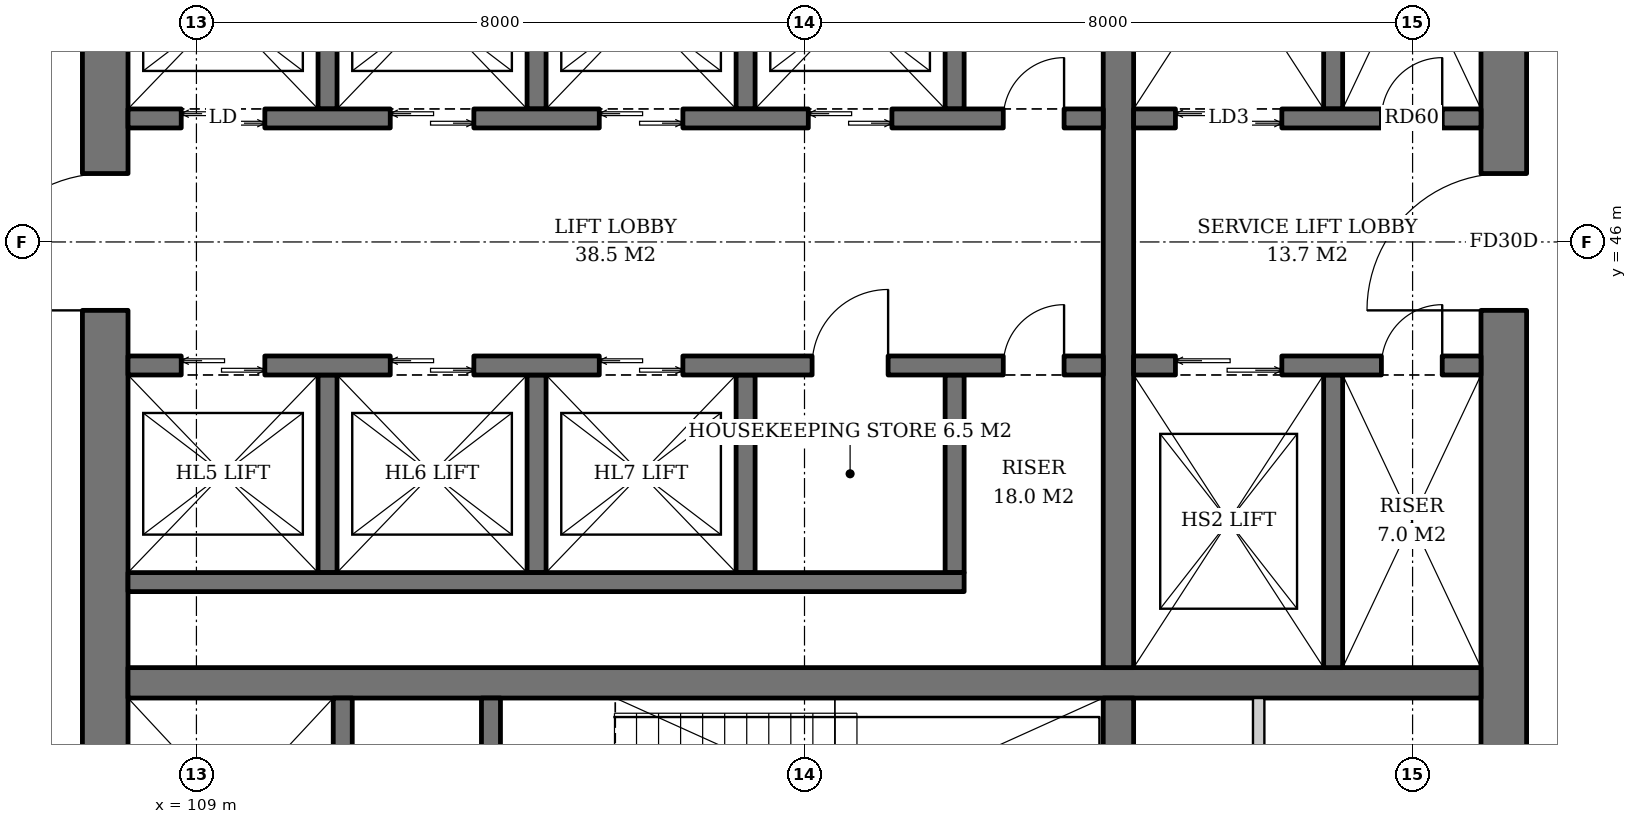
"""IFC4 building model, lengths in metres.
Left out: names, types, materials, properties, quantities, classifications, styles, units other than length and angle.
Written with IfcOpenShell. Run it as: python <this file> out.ifc"""

import sys

from ifc_helpers import new_model, si_unit, direction, frame, frame_2d, origin, place, context, subcontext, project, spatial, rectangle, extrude, element, fill, save


model = new_model("IFC4")
c1 = context("Model", 3, precision=1e-05, world=origin(), true_north=direction((0.0, 1.0)))
c2 = subcontext(c1, "Body", "Model", "MODEL_VIEW")
j1 = project(units=[si_unit("LENGTHUNIT", "METRE"), si_unit("PLANEANGLEUNIT", "RADIAN")], contexts=[c1])
p1 = place(None, origin())
s1 = spatial("IfcSite", under=j1, at=p1, CompositionType="ELEMENT")
p2 = place(p1, origin())
s2 = spatial("IfcBuilding", under=s1, at=p2, CompositionType="ELEMENT")
p3 = place(p2, frame((0.0, 0.0, 74.2)))
s3 = spatial("IfcBuildingStorey", under=s2, at=p3, CompositionType="ELEMENT", Elevation=74.2)
p4 = place(p3, frame((107.8, 37.1, 0.0), z_axis=(0.0, 0.0, 1.0), x_axis=(0.0, 1.0, 0.0)))
e1 = element("IfcWall", 1, at=p4, inside=s3, PredefinedType="SHEAR", context=c2, shape_type="SweptSolid", body=[
    extrude(rectangle(XDim=17.8, YDim=0.6, at=frame_2d((8.9, 0.0))), origin(), (0.0, 0.0, 1.0), 3.8),
])
p5 = place(p4, frame((8.0, 0.0, 0.0)))
e2 = element("IfcOpeningElement", 2, at=p5, cuts=e1, PredefinedType="OPENING", context=c2, shape_type="SweptSolid", body=[
    extrude(rectangle(XDim=1.8, YDim=2.4, at=frame_2d((0.9, 1.2))), frame((0.0, 0.31, 0.0), z_axis=(0.0, -1.0, 0.0), x_axis=(1.0, 0.0, 0.0)), (0.0, 0.0, 1.0), 0.62),
])
p6 = place(p3, frame((126.2, 37.1, 0.0), z_axis=(0.0, 0.0, 1.0), x_axis=(0.0, 1.0, 0.0)))
e3 = element("IfcWall", 3, at=p6, inside=s3, PredefinedType="SHEAR", context=c2, shape_type="SweptSolid", body=[
    extrude(rectangle(XDim=17.8, YDim=0.6, at=frame_2d((8.9, 0.0))), origin(), (0.0, 0.0, 1.0), 3.8),
])
p7 = place(p6, frame((8.0, 0.0, 0.0)))
e4 = element("IfcOpeningElement", 4, at=p7, cuts=e3, PredefinedType="OPENING", context=c2, shape_type="SweptSolid", body=[
    extrude(rectangle(XDim=1.8, YDim=2.4, at=frame_2d((0.9, 1.2))), frame((0.0, 0.31, 0.0), z_axis=(0.0, -1.0, 0.0), x_axis=(1.0, 0.0, 0.0)), (0.0, 0.0, 1.0), 0.62),
])
p8 = place(p3, frame((108.1, 40.2, 0.0), z_axis=(0.0, 0.0, 1.0), x_axis=(1.0, 0.0, 0.0)))
e5 = element("IfcWall", 5, at=p8, inside=s3, PredefinedType="SHEAR", context=c2, shape_type="SweptSolid", body=[
    extrude(rectangle(XDim=17.8, YDim=0.4, at=frame_2d((8.9, 0.0))), origin(), (0.0, 0.0, 1.0), 3.8),
])
p9 = place(p3, frame((121.13, 37.1, 0.0), z_axis=(0.0, 0.0, 1.0), x_axis=(0.0, 1.0, 0.0)))
e6 = element("IfcWall", 6, at=p9, inside=s3, PredefinedType="SHEAR", context=c2, shape_type="SweptSolid", body=[
    extrude(rectangle(XDim=2.9, YDim=0.4, at=frame_2d((1.45, 0.0))), origin(), (0.0, 0.0, 1.0), 3.8),
])
p10 = place(p3, frame((121.13, 40.4, 0.0), z_axis=(0.0, 0.0, 1.0), x_axis=(0.0, 1.0, 0.0)))
e7 = element("IfcWall", 7, at=p10, inside=s3, PredefinedType="SHEAR", context=c2, shape_type="SweptSolid", body=[
    extrude(rectangle(XDim=11.2, YDim=0.4, at=frame_2d((5.6, 0.0))), origin(), (0.0, 0.0, 1.0), 3.8),
])
p11 = place(p3, frame((110.925, 37.1, 0.0), z_axis=(0.0, 0.0, 1.0), x_axis=(0.0, 1.0, 0.0)))
e8 = element("IfcWall", 8, at=p11, inside=s3, PredefinedType="SHEAR", context=c2, shape_type="SweptSolid", body=[
    extrude(rectangle(XDim=2.9, YDim=0.25, at=frame_2d((1.45, 0.0))), origin(), (0.0, 0.0, 1.0), 3.8),
])
p12 = place(p11, frame((0.8, 0.0, 0.0)))
e9 = element("IfcOpeningElement", 9, at=p12, cuts=e8, PredefinedType="OPENING", context=c2, shape_type="SweptSolid", body=[
    extrude(rectangle(XDim=1.3, YDim=2.2, at=frame_2d((0.65, 1.1))), frame((0.0, 0.135, 0.0), z_axis=(0.0, -1.0, 0.0), x_axis=(1.0, 0.0, 0.0)), (0.0, 0.0, 1.0), 0.27),
])
p13 = place(p3, frame((112.875, 37.1, 0.0), z_axis=(0.0, 0.0, 1.0), x_axis=(0.0, 1.0, 0.0)))
e10 = element("IfcWall", 10, at=p13, inside=s3, PredefinedType="SHEAR", context=c2, shape_type="SweptSolid", body=[
    extrude(rectangle(XDim=2.9, YDim=0.25, at=frame_2d((1.45, 0.0))), origin(), (0.0, 0.0, 1.0), 3.8),
])
p14 = place(p13, frame((0.75, 0.0, 0.0)))
e11 = element("IfcOpeningElement", 11, at=p14, cuts=e10, PredefinedType="OPENING", context=c2, shape_type="SweptSolid", body=[
    extrude(rectangle(XDim=1.2, YDim=2.1, at=frame_2d((0.6, 1.05))), frame((0.0, 0.135, 0.0), z_axis=(0.0, -1.0, 0.0), x_axis=(1.0, 0.0, 0.0)), (0.0, 0.0, 1.0), 0.27),
])
for number, where, z_axis, x_axis in (
    (12, (110.725, 47.75, 0.0), (0.0, 0.0, 1.0), (0.0, 1.0, 0.0)),
    (13, (113.475, 47.75, 0.0), (0.0, 0.0, 1.0), (0.0, 1.0, 0.0)),
    (14, (116.225, 47.75, 0.0), (0.0, 0.0, 1.0), (0.0, 1.0, 0.0)),
    (15, (118.975, 47.75, 0.0), (0.0, 0.0, 1.0), (0.0, 1.0, 0.0)),
):
    element("IfcWall", number, at=place(p3, frame(where, z_axis=z_axis, x_axis=x_axis)), inside=s3, PredefinedType="SHEAR", context=c2, shape_type="SweptSolid", body=[
        extrude(rectangle(XDim=2.6, YDim=0.25, at=frame_2d((1.3, 0.0))), origin(), (0.0, 0.0, 1.0), 3.8),
    ])
p15 = place(p3, frame((108.1, 47.625, 0.0), z_axis=(0.0, 0.0, 1.0), x_axis=(1.0, 0.0, 0.0)))
e16 = element("IfcWall", 16, at=p15, inside=s3, PredefinedType="SHEAR", context=c2, shape_type="SweptSolid", body=[
    extrude(rectangle(XDim=12.83, YDim=0.25, at=frame_2d((6.415, 0.0))), origin(), (0.0, 0.0, 1.0), 3.8),
])
p16 = place(p15, frame((0.7, 0.0, 0.0)))
e17 = element("IfcOpeningElement", 17, at=p16, cuts=e16, PredefinedType="OPENING", context=c2, shape_type="SweptSolid", body=[
    extrude(rectangle(XDim=1.1, YDim=2.2, at=frame_2d((0.55, 1.1))), frame((0.0, 0.135, 0.0), z_axis=(0.0, -1.0, 0.0), x_axis=(1.0, 0.0, 0.0)), (0.0, 0.0, 1.0), 0.27),
])
p17 = place(p15, frame((3.45, 0.0, 0.0)))
e18 = element("IfcOpeningElement", 18, at=p17, cuts=e16, PredefinedType="OPENING", context=c2, shape_type="SweptSolid", body=[
    extrude(rectangle(XDim=1.1, YDim=2.2, at=frame_2d((0.55, 1.1))), frame((0.0, 0.135, 0.0), z_axis=(0.0, -1.0, 0.0), x_axis=(1.0, 0.0, 0.0)), (0.0, 0.0, 1.0), 0.27),
])
p18 = place(p15, frame((6.2, 0.0, 0.0)))
e19 = element("IfcOpeningElement", 19, at=p18, cuts=e16, PredefinedType="OPENING", context=c2, shape_type="SweptSolid", body=[
    extrude(rectangle(XDim=1.1, YDim=2.2, at=frame_2d((0.55, 1.1))), frame((0.0, 0.135, 0.0), z_axis=(0.0, -1.0, 0.0), x_axis=(1.0, 0.0, 0.0)), (0.0, 0.0, 1.0), 0.27),
])
p19 = place(p15, frame((8.95, 0.0, 0.0)))
e20 = element("IfcOpeningElement", 20, at=p19, cuts=e16, PredefinedType="OPENING", context=c2, shape_type="SweptSolid", body=[
    extrude(rectangle(XDim=1.1, YDim=2.2, at=frame_2d((0.55, 1.1))), frame((0.0, 0.135, 0.0), z_axis=(0.0, -1.0, 0.0), x_axis=(1.0, 0.0, 0.0)), (0.0, 0.0, 1.0), 0.27),
])
p20 = place(p15, frame((11.515, 0.0, 0.0)))
e21 = element("IfcOpeningElement", 21, at=p20, cuts=e16, PredefinedType="OPENING", context=c2, shape_type="SweptSolid", body=[
    extrude(rectangle(XDim=0.8, YDim=2.0, at=frame_2d((0.4, 1.0))), frame((0.0, 0.135, 0.0), z_axis=(0.0, -1.0, 0.0), x_axis=(1.0, 0.0, 0.0)), (0.0, 0.0, 1.0), 0.27),
])
for number, where, z_axis, x_axis in (
    (22, (110.725, 44.25, 0.0), (0.0, 0.0, 1.0), (0.0, -1.0, 0.0)),
    (23, (113.475, 44.25, 0.0), (0.0, 0.0, 1.0), (0.0, -1.0, 0.0)),
    (24, (116.225, 44.25, 0.0), (0.0, 0.0, 1.0), (0.0, -1.0, 0.0)),
    (25, (118.975, 44.25, 0.0), (0.0, 0.0, 1.0), (0.0, -1.0, 0.0)),
):
    element("IfcWall", number, at=place(p3, frame(where, z_axis=z_axis, x_axis=x_axis)), inside=s3, PredefinedType="SHEAR", context=c2, shape_type="SweptSolid", body=[
        extrude(rectangle(XDim=2.6, YDim=0.25, at=frame_2d((1.3, 0.0))), origin(), (0.0, 0.0, 1.0), 3.8),
    ])
p21 = place(p3, frame((108.1, 41.525, 0.0), z_axis=(0.0, 0.0, 1.0), x_axis=(1.0, 0.0, 0.0)))
e26 = element("IfcWall", 26, at=p21, inside=s3, PredefinedType="SHEAR", context=c2, shape_type="SweptSolid", body=[
    extrude(rectangle(XDim=11.0, YDim=0.25, at=frame_2d((5.5, 0.0))), origin(), (0.0, 0.0, 1.0), 3.8),
])
p22 = place(p3, frame((108.1, 44.375, 0.0), z_axis=(0.0, 0.0, 1.0), x_axis=(1.0, 0.0, 0.0)))
e27 = element("IfcWall", 27, at=p22, inside=s3, PredefinedType="SHEAR", context=c2, shape_type="SweptSolid", body=[
    extrude(rectangle(XDim=12.83, YDim=0.25, at=frame_2d((6.415, 0.0))), origin(), (0.0, 0.0, 1.0), 3.8),
])
p23 = place(p22, frame((0.7, 0.0, 0.0)))
e28 = element("IfcOpeningElement", 28, at=p23, cuts=e27, PredefinedType="OPENING", context=c2, shape_type="SweptSolid", body=[
    extrude(rectangle(XDim=1.1, YDim=2.2, at=frame_2d((0.55, 1.1))), frame((0.0, 0.135, 0.0), z_axis=(0.0, -1.0, 0.0), x_axis=(1.0, 0.0, 0.0)), (0.0, 0.0, 1.0), 0.27),
])
p24 = place(p22, frame((3.45, 0.0, 0.0)))
e29 = element("IfcOpeningElement", 29, at=p24, cuts=e27, PredefinedType="OPENING", context=c2, shape_type="SweptSolid", body=[
    extrude(rectangle(XDim=1.1, YDim=2.2, at=frame_2d((0.55, 1.1))), frame((0.0, 0.135, 0.0), z_axis=(0.0, -1.0, 0.0), x_axis=(1.0, 0.0, 0.0)), (0.0, 0.0, 1.0), 0.27),
])
p25 = place(p22, frame((6.2, 0.0, 0.0)))
e30 = element("IfcOpeningElement", 30, at=p25, cuts=e27, PredefinedType="OPENING", context=c2, shape_type="SweptSolid", body=[
    extrude(rectangle(XDim=1.1, YDim=2.2, at=frame_2d((0.55, 1.1))), frame((0.0, 0.135, 0.0), z_axis=(0.0, -1.0, 0.0), x_axis=(1.0, 0.0, 0.0)), (0.0, 0.0, 1.0), 0.27),
])
p26 = place(p22, frame((9.0, 0.0, 0.0)))
e31 = element("IfcOpeningElement", 31, at=p26, cuts=e27, PredefinedType="OPENING", context=c2, shape_type="SweptSolid", body=[
    extrude(rectangle(XDim=1.0, YDim=2.1, at=frame_2d((0.5, 1.05))), frame((0.0, 0.135, 0.0), z_axis=(0.0, -1.0, 0.0), x_axis=(1.0, 0.0, 0.0)), (0.0, 0.0, 1.0), 0.27),
])
p27 = place(p22, frame((11.515, 0.0, 0.0)))
e32 = element("IfcOpeningElement", 32, at=p27, cuts=e27, PredefinedType="OPENING", context=c2, shape_type="SweptSolid", body=[
    extrude(rectangle(XDim=0.8, YDim=2.0, at=frame_2d((0.4, 1.0))), frame((0.0, 0.135, 0.0), z_axis=(0.0, -1.0, 0.0), x_axis=(1.0, 0.0, 0.0)), (0.0, 0.0, 1.0), 0.27),
])
p28 = place(p3, frame((123.955, 47.75, 0.0), z_axis=(0.0, 0.0, 1.0), x_axis=(0.0, 1.0, 0.0)))
e33 = element("IfcWall", 33, at=p28, inside=s3, PredefinedType="SHEAR", context=c2, shape_type="SweptSolid", body=[
    extrude(rectangle(XDim=3.85, YDim=0.25, at=frame_2d((1.925, 0.0))), origin(), (0.0, 0.0, 1.0), 3.8),
])
p29 = place(p3, frame((121.33, 47.625, 0.0), z_axis=(0.0, 0.0, 1.0), x_axis=(1.0, 0.0, 0.0)))
e34 = element("IfcWall", 34, at=p29, inside=s3, PredefinedType="SHEAR", context=c2, shape_type="SweptSolid", body=[
    extrude(rectangle(XDim=4.57, YDim=0.25, at=frame_2d((2.285, 0.0))), origin(), (0.0, 0.0, 1.0), 3.8),
])
p30 = place(p29, frame((0.55, 0.0, 0.0)))
e35 = element("IfcOpeningElement", 35, at=p30, cuts=e34, PredefinedType="OPENING", context=c2, shape_type="SweptSolid", body=[
    extrude(rectangle(XDim=1.4, YDim=2.4, at=frame_2d((0.7, 1.2))), frame((0.0, 0.135, 0.0), z_axis=(0.0, -1.0, 0.0), x_axis=(1.0, 0.0, 0.0)), (0.0, 0.0, 1.0), 0.27),
])
p31 = place(p29, frame((3.26, 0.0, 0.0)))
e36 = element("IfcOpeningElement", 36, at=p31, cuts=e34, PredefinedType="OPENING", context=c2, shape_type="SweptSolid", body=[
    extrude(rectangle(XDim=0.8, YDim=2.0, at=frame_2d((0.4, 1.0))), frame((0.0, 0.135, 0.0), z_axis=(0.0, -1.0, 0.0), x_axis=(1.0, 0.0, 0.0)), (0.0, 0.0, 1.0), 0.27),
])
p32 = place(p3, frame((123.955, 44.25, 0.0), z_axis=(0.0, 0.0, 1.0), x_axis=(0.0, -1.0, 0.0)))
e37 = element("IfcWall", 37, at=p32, inside=s3, PredefinedType="SHEAR", context=c2, shape_type="SweptSolid", body=[
    extrude(rectangle(XDim=3.85, YDim=0.25, at=frame_2d((1.925, 0.0))), origin(), (0.0, 0.0, 1.0), 3.8),
])
p33 = place(p3, frame((121.33, 44.375, 0.0), z_axis=(0.0, 0.0, 1.0), x_axis=(1.0, 0.0, 0.0)))
e38 = element("IfcWall", 38, at=p33, inside=s3, PredefinedType="SHEAR", context=c2, shape_type="SweptSolid", body=[
    extrude(rectangle(XDim=4.57, YDim=0.25, at=frame_2d((2.285, 0.0))), origin(), (0.0, 0.0, 1.0), 3.8),
])
p34 = place(p33, frame((0.55, 0.0, 0.0)))
e39 = element("IfcOpeningElement", 39, at=p34, cuts=e38, PredefinedType="OPENING", context=c2, shape_type="SweptSolid", body=[
    extrude(rectangle(XDim=1.4, YDim=2.4, at=frame_2d((0.7, 1.2))), frame((0.0, 0.135, 0.0), z_axis=(0.0, -1.0, 0.0), x_axis=(1.0, 0.0, 0.0)), (0.0, 0.0, 1.0), 0.27),
])
p35 = place(p33, frame((3.26, 0.0, 0.0)))
e40 = element("IfcOpeningElement", 40, at=p35, cuts=e38, PredefinedType="OPENING", context=c2, shape_type="SweptSolid", body=[
    extrude(rectangle(XDim=0.8, YDim=2.0, at=frame_2d((0.4, 1.0))), frame((0.0, 0.135, 0.0), z_axis=(0.0, -1.0, 0.0), x_axis=(1.0, 0.0, 0.0)), (0.0, 0.0, 1.0), 0.27),
])
p36 = place(p3, frame((122.975, 37.1, 0.0), z_axis=(0.0, 0.0, 1.0), x_axis=(0.0, 1.0, 0.0)))
e41 = element("IfcWall", 41, at=p36, inside=s3, PredefinedType="SOLIDWALL", context=c2, shape_type="SweptSolid", body=[
    extrude(rectangle(XDim=2.9, YDim=0.15, at=frame_2d((1.45, 0.0))), origin(), (0.0, 0.0, 1.0), 3.6),
])
p37 = place(p16, origin())
e42 = element("IfcDoor", 42, at=p37, inside=s3, OperationType="DOUBLE_DOOR_SLIDING", PredefinedType="DOOR", context=c2, shape_type="SweptSolid", body=[
    extrude(rectangle(XDim=1.1, YDim=2.2, at=frame_2d((0.55, 1.1))), frame((0.0, 0.025, 0.0), z_axis=(0.0, -1.0, 0.0), x_axis=(1.0, 0.0, 0.0)), (0.0, 0.0, 1.0), 0.05),
])
fill(e17, e42)
p38 = place(p17, origin())
e43 = element("IfcDoor", 43, at=p38, inside=s3, OperationType="DOUBLE_DOOR_SLIDING", PredefinedType="DOOR", context=c2, shape_type="SweptSolid", body=[
    extrude(rectangle(XDim=1.1, YDim=2.2, at=frame_2d((0.55, 1.1))), frame((0.0, 0.025, 0.0), z_axis=(0.0, -1.0, 0.0), x_axis=(1.0, 0.0, 0.0)), (0.0, 0.0, 1.0), 0.05),
])
fill(e18, e43)
p39 = place(p18, origin())
e44 = element("IfcDoor", 44, at=p39, inside=s3, OperationType="DOUBLE_DOOR_SLIDING", PredefinedType="DOOR", context=c2, shape_type="SweptSolid", body=[
    extrude(rectangle(XDim=1.1, YDim=2.2, at=frame_2d((0.55, 1.1))), frame((0.0, 0.025, 0.0), z_axis=(0.0, -1.0, 0.0), x_axis=(1.0, 0.0, 0.0)), (0.0, 0.0, 1.0), 0.05),
])
fill(e19, e44)
p40 = place(p19, origin())
e45 = element("IfcDoor", 45, at=p40, inside=s3, OperationType="DOUBLE_DOOR_SLIDING", PredefinedType="DOOR", context=c2, shape_type="SweptSolid", body=[
    extrude(rectangle(XDim=1.1, YDim=2.2, at=frame_2d((0.55, 1.1))), frame((0.0, 0.025, 0.0), z_axis=(0.0, -1.0, 0.0), x_axis=(1.0, 0.0, 0.0)), (0.0, 0.0, 1.0), 0.05),
])
fill(e20, e45)
p41 = place(p20, origin())
e46 = element("IfcDoor", 46, at=p41, inside=s3, OperationType="SINGLE_SWING_RIGHT", PredefinedType="DOOR", context=c2, shape_type="SweptSolid", body=[
    extrude(rectangle(XDim=0.8, YDim=2.0, at=frame_2d((0.4, 1.0))), frame((0.0, 0.025, 0.0), z_axis=(0.0, -1.0, 0.0), x_axis=(1.0, 0.0, 0.0)), (0.0, 0.0, 1.0), 0.05),
])
fill(e21, e46)
p42 = place(p23, origin())
e47 = element("IfcDoor", 47, at=p42, inside=s3, OperationType="DOUBLE_DOOR_SLIDING", PredefinedType="DOOR", context=c2, shape_type="SweptSolid", body=[
    extrude(rectangle(XDim=1.1, YDim=2.2, at=frame_2d((0.55, 1.1))), frame((0.0, 0.025, 0.0), z_axis=(0.0, -1.0, 0.0), x_axis=(1.0, 0.0, 0.0)), (0.0, 0.0, 1.0), 0.05),
])
fill(e28, e47)
p43 = place(p24, origin())
e48 = element("IfcDoor", 48, at=p43, inside=s3, OperationType="DOUBLE_DOOR_SLIDING", PredefinedType="DOOR", context=c2, shape_type="SweptSolid", body=[
    extrude(rectangle(XDim=1.1, YDim=2.2, at=frame_2d((0.55, 1.1))), frame((0.0, 0.025, 0.0), z_axis=(0.0, -1.0, 0.0), x_axis=(1.0, 0.0, 0.0)), (0.0, 0.0, 1.0), 0.05),
])
fill(e29, e48)
p44 = place(p25, origin())
e49 = element("IfcDoor", 49, at=p44, inside=s3, OperationType="DOUBLE_DOOR_SLIDING", PredefinedType="DOOR", context=c2, shape_type="SweptSolid", body=[
    extrude(rectangle(XDim=1.1, YDim=2.2, at=frame_2d((0.55, 1.1))), frame((0.0, 0.025, 0.0), z_axis=(0.0, -1.0, 0.0), x_axis=(1.0, 0.0, 0.0)), (0.0, 0.0, 1.0), 0.05),
])
fill(e30, e49)
p45 = place(p26, origin())
e50 = element("IfcDoor", 50, at=p45, inside=s3, OperationType="SINGLE_SWING_RIGHT", PredefinedType="DOOR", context=c2, shape_type="SweptSolid", body=[
    extrude(rectangle(XDim=1.0, YDim=2.1, at=frame_2d((0.5, 1.05))), frame((0.0, 0.025, 0.0), z_axis=(0.0, -1.0, 0.0), x_axis=(1.0, 0.0, 0.0)), (0.0, 0.0, 1.0), 0.05),
])
fill(e31, e50)
p46 = place(p27, origin())
e51 = element("IfcDoor", 51, at=p46, inside=s3, OperationType="SINGLE_SWING_RIGHT", PredefinedType="DOOR", context=c2, shape_type="SweptSolid", body=[
    extrude(rectangle(XDim=0.8, YDim=2.0, at=frame_2d((0.4, 1.0))), frame((0.0, 0.025, 0.0), z_axis=(0.0, -1.0, 0.0), x_axis=(1.0, 0.0, 0.0)), (0.0, 0.0, 1.0), 0.05),
])
fill(e32, e51)
p47 = place(p30, origin())
e52 = element("IfcDoor", 52, at=p47, inside=s3, OperationType="DOUBLE_DOOR_SLIDING", PredefinedType="DOOR", context=c2, shape_type="SweptSolid", body=[
    extrude(rectangle(XDim=1.4, YDim=2.4, at=frame_2d((0.7, 1.2))), frame((0.0, 0.025, 0.0), z_axis=(0.0, -1.0, 0.0), x_axis=(1.0, 0.0, 0.0)), (0.0, 0.0, 1.0), 0.05),
])
fill(e35, e52)
p48 = place(p31, origin())
e53 = element("IfcDoor", 53, at=p48, inside=s3, OperationType="SINGLE_SWING_RIGHT", PredefinedType="DOOR", context=c2, shape_type="SweptSolid", body=[
    extrude(rectangle(XDim=0.8, YDim=2.0, at=frame_2d((0.4, 1.0))), frame((0.0, 0.025, 0.0), z_axis=(0.0, -1.0, 0.0), x_axis=(1.0, 0.0, 0.0)), (0.0, 0.0, 1.0), 0.05),
])
fill(e36, e53)
p49 = place(p34, origin())
e54 = element("IfcDoor", 54, at=p49, inside=s3, OperationType="DOUBLE_DOOR_SLIDING", PredefinedType="DOOR", context=c2, shape_type="SweptSolid", body=[
    extrude(rectangle(XDim=1.4, YDim=2.4, at=frame_2d((0.7, 1.2))), frame((0.0, 0.025, 0.0), z_axis=(0.0, -1.0, 0.0), x_axis=(1.0, 0.0, 0.0)), (0.0, 0.0, 1.0), 0.05),
])
fill(e39, e54)
p50 = place(p35, origin())
e55 = element("IfcDoor", 55, at=p50, inside=s3, OperationType="SINGLE_SWING_RIGHT", PredefinedType="DOOR", context=c2, shape_type="SweptSolid", body=[
    extrude(rectangle(XDim=0.8, YDim=2.0, at=frame_2d((0.4, 1.0))), frame((0.0, 0.025, 0.0), z_axis=(0.0, -1.0, 0.0), x_axis=(1.0, 0.0, 0.0)), (0.0, 0.0, 1.0), 0.05),
])
fill(e40, e55)
p51 = place(p5, origin())
e56 = element("IfcDoor", 56, at=p51, inside=s3, OperationType="DOUBLE_DOOR_SINGLE_SWING", PredefinedType="DOOR", context=c2, shape_type="SweptSolid", body=[
    extrude(rectangle(XDim=1.8, YDim=2.4, at=frame_2d((0.9, 1.2))), frame((0.0, 0.025, 0.0), z_axis=(0.0, -1.0, 0.0), x_axis=(1.0, 0.0, 0.0)), (0.0, 0.0, 1.0), 0.05),
])
fill(e2, e56)
p52 = place(p7, origin())
e57 = element("IfcDoor", 57, at=p52, inside=s3, OperationType="DOUBLE_DOOR_SINGLE_SWING", PredefinedType="DOOR", context=c2, shape_type="SweptSolid", body=[
    extrude(rectangle(XDim=1.8, YDim=2.4, at=frame_2d((0.9, 1.2))), frame((0.0, 0.025, 0.0), z_axis=(0.0, -1.0, 0.0), x_axis=(1.0, 0.0, 0.0)), (0.0, 0.0, 1.0), 0.05),
])
fill(e4, e57)
save(model, sys.argv[1])
